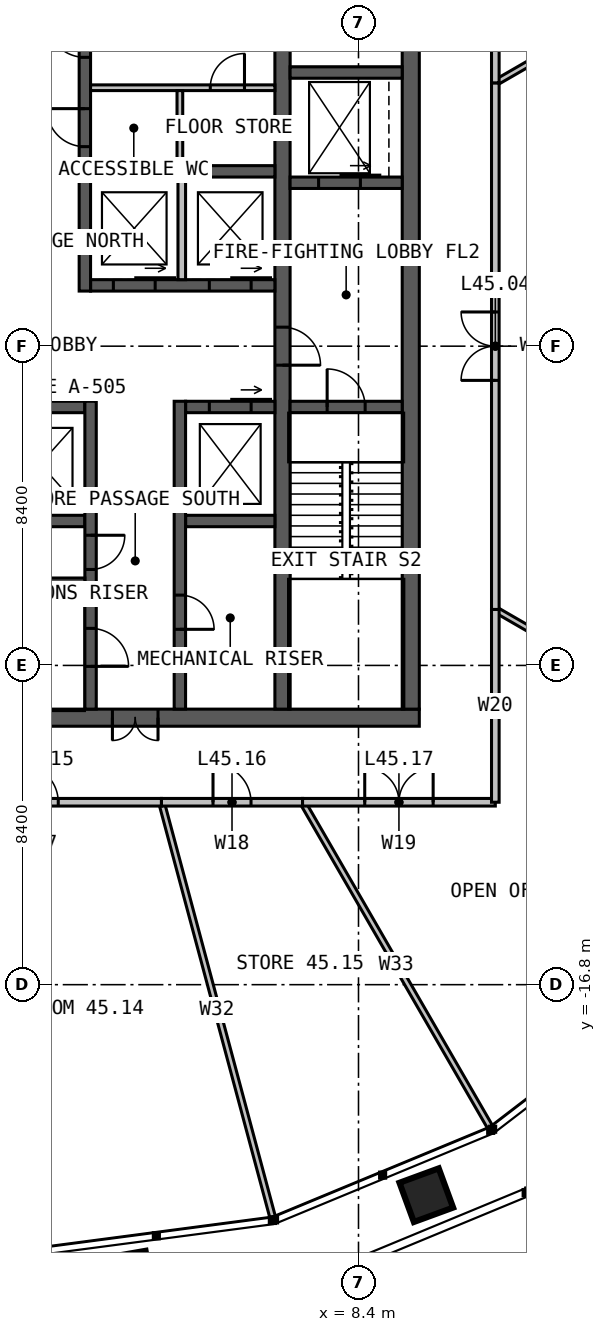
"""IFC4 building model, lengths in metres.
Left out: names, types, materials, properties, quantities, classifications, styles, units other than length and angle.
Written with IfcOpenShell. Run it as: python <this file> out.ifc"""

import sys

from ifc_helpers import new_model, si_unit, direction, frame, frame_2d, origin, place, context, subcontext, project, spatial, rectangle, extrude, element, fill, save


model = new_model("IFC4")
c1 = context("Model", 3, precision=1e-05, world=origin(), true_north=direction((0.0, 1.0)))
c2 = subcontext(c1, "Body", "Model", "MODEL_VIEW")
j1 = project(units=[si_unit("LENGTHUNIT", "METRE"), si_unit("PLANEANGLEUNIT", "RADIAN")], contexts=[c1])
p1 = place(None, origin())
s1 = spatial("IfcSite", under=j1, at=p1, CompositionType="ELEMENT")
p2 = place(p1, origin())
s2 = spatial("IfcBuilding", under=s1, at=p2, CompositionType="ELEMENT")
p3 = place(p2, frame((0.0, 0.0, 187.0)))
s3 = spatial("IfcBuildingStorey", under=s2, at=p3, CompositionType="ELEMENT", Elevation=187.0)
p4 = place(p3, frame((10.0, -9.775, 0.0), z_axis=(0.0, 0.0, 1.0), x_axis=(-1.0, 0.0, 0.0)))
e1 = element("IfcWall", 1, at=p4, inside=s3, PredefinedType="SOLIDWALL", context=c2, shape_type="SweptSolid", body=[
    extrude(rectangle(XDim=20.0, YDim=0.45, at=frame_2d((10.0, 0.0))), origin(), (0.0, 0.0, 1.0), 4.0),
])
p5 = place(p4, frame((6.875, 0.0, 0.0)))
e2 = element("IfcOpeningElement", 2, at=p5, cuts=e1, PredefinedType="OPENING", context=c2, shape_type="SweptSolid", body=[
    extrude(rectangle(XDim=1.2, YDim=2.2, at=frame_2d((0.6, 1.1))), frame((0.0, 0.235, 0.0), z_axis=(0.0, -1.0, 0.0), x_axis=(1.0, 0.0, 0.0)), (0.0, 0.0, 1.0), 0.47),
])
p6 = place(p3, frame((9.775, -9.55, 0.0), z_axis=(0.0, 0.0, 1.0), x_axis=(0.0, 1.0, 0.0)))
e3 = element("IfcWall", 3, at=p6, inside=s3, PredefinedType="SOLIDWALL", context=c2, shape_type="SweptSolid", body=[
    extrude(rectangle(XDim=19.1, YDim=0.45, at=frame_2d((9.55, 0.0))), origin(), (0.0, 0.0, 1.0), 4.0),
])
p7 = place(p3, frame((6.4, 9.55, 0.0), z_axis=(0.0, 0.0, 1.0), x_axis=(0.0, -1.0, 0.0)))
e4 = element("IfcWall", 4, at=p7, inside=s3, PredefinedType="SOLIDWALL", context=c2, shape_type="SweptSolid", body=[
    extrude(rectangle(XDim=19.1, YDim=0.4, at=frame_2d((9.55, 0.0))), origin(), (0.0, 0.0, 1.0), 4.0),
])
p8 = place(p7, frame((9.05, 0.0, 0.0)))
e5 = element("IfcOpeningElement", 5, at=p8, cuts=e4, PredefinedType="OPENING", context=c2, shape_type="SweptSolid", body=[
    extrude(rectangle(XDim=1.0, YDim=2.2, at=frame_2d((0.5, 1.1))), frame((0.0, 0.21, 0.0), z_axis=(0.0, -1.0, 0.0), x_axis=(1.0, 0.0, 0.0)), (0.0, 0.0, 1.0), 0.42),
])
p9 = place(p3, frame((1.35, 1.6, 0.0), z_axis=(0.0, 0.0, 1.0), x_axis=(1.0, 0.0, 0.0)))
e6 = element("IfcWall", 6, at=p9, inside=s3, PredefinedType="SOLIDWALL", context=c2, shape_type="SweptSolid", body=[
    extrude(rectangle(XDim=4.85, YDim=0.3, at=frame_2d((2.425, 0.0))), origin(), (0.0, 0.0, 1.0), 4.0),
])
p10 = place(p9, frame((0.6, 0.0, 0.0)))
e7 = element("IfcOpeningElement", 7, at=p10, cuts=e6, PredefinedType="OPENING", context=c2, shape_type="SweptSolid", body=[
    extrude(rectangle(XDim=1.1, YDim=2.2, at=frame_2d((0.55, 1.1))), frame((0.0, 0.16, 0.0), z_axis=(0.0, -1.0, 0.0), x_axis=(1.0, 0.0, 0.0)), (0.0, 0.0, 1.0), 0.32),
])
p11 = place(p9, frame((3.125, 0.0, 0.0)))
e8 = element("IfcOpeningElement", 8, at=p11, cuts=e6, PredefinedType="OPENING", context=c2, shape_type="SweptSolid", body=[
    extrude(rectangle(XDim=1.1, YDim=2.2, at=frame_2d((0.55, 1.1))), frame((0.0, 0.16, 0.0), z_axis=(0.0, -1.0, 0.0), x_axis=(1.0, 0.0, 0.0)), (0.0, 0.0, 1.0), 0.32),
])
p12 = place(p3, frame((1.35, 4.6, 0.0), z_axis=(0.0, 0.0, 1.0), x_axis=(1.0, 0.0, 0.0)))
e9 = element("IfcWall", 9, at=p12, inside=s3, PredefinedType="SOLIDWALL", context=c2, shape_type="SweptSolid", body=[
    extrude(rectangle(XDim=4.85, YDim=0.3, at=frame_2d((2.425, 0.0))), origin(), (0.0, 0.0, 1.0), 4.0),
])
p13 = place(p3, frame((1.2, 1.45, 0.0), z_axis=(0.0, 0.0, 1.0), x_axis=(0.0, 1.0, 0.0)))
e10 = element("IfcWall", 10, at=p13, inside=s3, PredefinedType="SOLIDWALL", context=c2, shape_type="SweptSolid", body=[
    extrude(rectangle(XDim=8.1, YDim=0.3, at=frame_2d((4.05, 0.0))), origin(), (0.0, 0.0, 1.0), 4.0),
])
p14 = place(p13, frame((3.8, 0.0, 0.0)))
e11 = element("IfcOpeningElement", 11, at=p14, cuts=e10, PredefinedType="OPENING", context=c2, shape_type="SweptSolid", body=[
    extrude(rectangle(XDim=1.0, YDim=2.2, at=frame_2d((0.5, 1.1))), frame((0.0, 0.16, 0.0), z_axis=(0.0, -1.0, 0.0), x_axis=(1.0, 0.0, 0.0)), (0.0, 0.0, 1.0), 0.32),
])
p15 = place(p13, frame((6.15, 0.0, 0.0)))
e12 = element("IfcOpeningElement", 12, at=p15, cuts=e10, PredefinedType="OPENING", context=c2, shape_type="SweptSolid", body=[
    extrude(rectangle(XDim=1.0, YDim=2.2, at=frame_2d((0.5, 1.1))), frame((0.0, 0.16, 0.0), z_axis=(0.0, -1.0, 0.0), x_axis=(1.0, 0.0, 0.0)), (0.0, 0.0, 1.0), 0.32),
])
p16 = place(p3, frame((-6.2, -1.6, 0.0), z_axis=(0.0, 0.0, 1.0), x_axis=(1.0, 0.0, 0.0)))
e13 = element("IfcWall", 13, at=p16, inside=s3, PredefinedType="SOLIDWALL", context=c2, shape_type="SweptSolid", body=[
    extrude(rectangle(XDim=7.4, YDim=0.3, at=frame_2d((3.7, 0.0))), origin(), (0.0, 0.0, 1.0), 4.0),
])
p17 = place(p3, frame((3.85, -1.6, 0.0), z_axis=(0.0, 0.0, 1.0), x_axis=(1.0, 0.0, 0.0)))
e14 = element("IfcWall", 14, at=p17, inside=s3, PredefinedType="SOLIDWALL", context=c2, shape_type="SweptSolid", body=[
    extrude(rectangle(XDim=2.35, YDim=0.3, at=frame_2d((1.175, 0.0))), origin(), (0.0, 0.0, 1.0), 4.0),
])
p18 = place(p17, frame((0.625, 0.0, 0.0)))
e15 = element("IfcOpeningElement", 15, at=p18, cuts=e14, PredefinedType="OPENING", context=c2, shape_type="SweptSolid", body=[
    extrude(rectangle(XDim=1.1, YDim=2.2, at=frame_2d((0.55, 1.1))), frame((0.0, 0.16, 0.0), z_axis=(0.0, -1.0, 0.0), x_axis=(1.0, 0.0, 0.0)), (0.0, 0.0, 1.0), 0.32),
])
p19 = place(p3, frame((-6.2, -4.6, 0.0), z_axis=(0.0, 0.0, 1.0), x_axis=(1.0, 0.0, 0.0)))
e16 = element("IfcWall", 16, at=p19, inside=s3, PredefinedType="SOLIDWALL", context=c2, shape_type="SweptSolid", body=[
    extrude(rectangle(XDim=7.4, YDim=0.3, at=frame_2d((3.7, 0.0))), origin(), (0.0, 0.0, 1.0), 4.0),
])
p20 = place(p3, frame((3.85, -4.6, 0.0), z_axis=(0.0, 0.0, 1.0), x_axis=(1.0, 0.0, 0.0)))
e17 = element("IfcWall", 17, at=p20, inside=s3, PredefinedType="SOLIDWALL", context=c2, shape_type="SweptSolid", body=[
    extrude(rectangle(XDim=2.35, YDim=0.3, at=frame_2d((1.175, 0.0))), origin(), (0.0, 0.0, 1.0), 4.0),
])
p21 = place(p3, frame((1.35, -1.45, 0.0), z_axis=(0.0, 0.0, 1.0), x_axis=(0.0, -1.0, 0.0)))
e18 = element("IfcWall", 18, at=p21, inside=s3, PredefinedType="SOLIDWALL", context=c2, shape_type="SweptSolid", body=[
    extrude(rectangle(XDim=8.1, YDim=0.3, at=frame_2d((4.05, 0.0))), origin(), (0.0, 0.0, 1.0), 4.0),
])
p22 = place(p21, frame((5.975, 0.0, 0.0)))
e19 = element("IfcOpeningElement", 19, at=p22, cuts=e18, PredefinedType="OPENING", context=c2, shape_type="SweptSolid", body=[
    extrude(rectangle(XDim=1.0, YDim=2.2, at=frame_2d((0.5, 1.1))), frame((0.0, 0.16, 0.0), z_axis=(0.0, -1.0, 0.0), x_axis=(1.0, 0.0, 0.0)), (0.0, 0.0, 1.0), 0.32),
])
p23 = place(p21, frame((3.525, 0.0, 0.0)))
e20 = element("IfcOpeningElement", 20, at=p23, cuts=e18, PredefinedType="OPENING", context=c2, shape_type="SweptSolid", body=[
    extrude(rectangle(XDim=0.9, YDim=2.2, at=frame_2d((0.45, 1.1))), frame((0.0, 0.16, 0.0), z_axis=(0.0, -1.0, 0.0), x_axis=(1.0, 0.0, 0.0)), (0.0, 0.0, 1.0), 0.32),
])
p24 = place(p3, frame((3.7, -1.45, 0.0), z_axis=(0.0, 0.0, 1.0), x_axis=(0.0, -1.0, 0.0)))
e21 = element("IfcWall", 21, at=p24, inside=s3, PredefinedType="SOLIDWALL", context=c2, shape_type="SweptSolid", body=[
    extrude(rectangle(XDim=8.1, YDim=0.3, at=frame_2d((4.05, 0.0))), origin(), (0.0, 0.0, 1.0), 4.0),
])
p25 = place(p24, frame((5.1, 0.0, 0.0)))
e22 = element("IfcOpeningElement", 22, at=p25, cuts=e21, PredefinedType="OPENING", context=c2, shape_type="SweptSolid", body=[
    extrude(rectangle(XDim=0.9, YDim=2.2, at=frame_2d((0.45, 1.1))), frame((0.0, 0.16, 0.0), z_axis=(0.0, -1.0, 0.0), x_axis=(1.0, 0.0, 0.0)), (0.0, 0.0, 1.0), 0.32),
])
p26 = place(p3, frame((-6.2, -6.2, 0.0), z_axis=(0.0, 0.0, 1.0), x_axis=(1.0, 0.0, 0.0)))
e23 = element("IfcWall", 23, at=p26, inside=s3, PredefinedType="SOLIDWALL", context=c2, shape_type="SweptSolid", body=[
    extrude(rectangle(XDim=7.4, YDim=0.2, at=frame_2d((3.7, 0.0))), origin(), (0.0, 0.0, 1.0), 4.0),
])
p27 = place(p3, frame((6.6, -1.6, 0.0), z_axis=(0.0, 0.0, 1.0), x_axis=(1.0, 0.0, 0.0)))
e24 = element("IfcWall", 24, at=p27, inside=s3, PredefinedType="SOLIDWALL", context=c2, shape_type="SweptSolid", body=[
    extrude(rectangle(XDim=2.95, YDim=0.3, at=frame_2d((1.475, 0.0))), origin(), (0.0, 0.0, 1.0), 4.0),
])
p28 = place(p27, frame((0.975, 0.0, 0.0)))
e25 = element("IfcOpeningElement", 25, at=p28, cuts=e24, PredefinedType="OPENING", context=c2, shape_type="SweptSolid", body=[
    extrude(rectangle(XDim=1.0, YDim=2.2, at=frame_2d((0.5, 1.1))), frame((0.0, 0.16, 0.0), z_axis=(0.0, -1.0, 0.0), x_axis=(1.0, 0.0, 0.0)), (0.0, 0.0, 1.0), 0.32),
])
p29 = place(p3, frame((6.6, 4.3, 0.0), z_axis=(0.0, 0.0, 1.0), x_axis=(1.0, 0.0, 0.0)))
e26 = element("IfcWall", 26, at=p29, inside=s3, PredefinedType="SOLIDWALL", context=c2, shape_type="SweptSolid", body=[
    extrude(rectangle(XDim=2.95, YDim=0.3, at=frame_2d((1.475, 0.0))), origin(), (0.0, 0.0, 1.0), 4.0),
])
p30 = place(p29, frame((0.75, 0.0, 0.0)))
e27 = element("IfcOpeningElement", 27, at=p30, cuts=e26, PredefinedType="OPENING", context=c2, shape_type="SweptSolid", body=[
    extrude(rectangle(XDim=1.1, YDim=2.2, at=frame_2d((0.55, 1.1))), frame((0.0, 0.16, 0.0), z_axis=(0.0, -1.0, 0.0), x_axis=(1.0, 0.0, 0.0)), (0.0, 0.0, 1.0), 0.32),
])
p31 = place(p3, frame((6.6, 7.2, 0.0), z_axis=(0.0, 0.0, 1.0), x_axis=(1.0, 0.0, 0.0)))
e28 = element("IfcWall", 28, at=p31, inside=s3, PredefinedType="SOLIDWALL", context=c2, shape_type="SweptSolid", body=[
    extrude(rectangle(XDim=2.95, YDim=0.3, at=frame_2d((1.475, 0.0))), origin(), (0.0, 0.0, 1.0), 4.0),
])
p32 = place(p3, frame((3.75, 1.75, 0.0), z_axis=(0.0, 0.0, 1.0), x_axis=(0.0, 1.0, 0.0)))
e29 = element("IfcWall", 29, at=p32, inside=s3, PredefinedType="SOLIDWALL", context=c2, shape_type="SweptSolid", body=[
    extrude(rectangle(XDim=2.7, YDim=0.2, at=frame_2d((1.35, 0.0))), origin(), (0.0, 0.0, 1.0), 3.75),
])
p33 = place(p3, frame((1.35, 6.8, 0.0), z_axis=(0.0, 0.0, 1.0), x_axis=(1.0, 0.0, 0.0)))
e30 = element("IfcWall", 30, at=p33, inside=s3, PredefinedType="PARTITIONING", context=c2, shape_type="SweptSolid", body=[
    extrude(rectangle(XDim=4.85, YDim=0.15, at=frame_2d((2.425, 0.0))), origin(), (0.0, 0.0, 1.0), 3.75),
])
p34 = place(p33, frame((3.15, 0.0, 0.0)))
e31 = element("IfcOpeningElement", 31, at=p34, cuts=e30, PredefinedType="OPENING", context=c2, shape_type="SweptSolid", body=[
    extrude(rectangle(XDim=0.9, YDim=2.2, at=frame_2d((0.45, 1.1))), frame((0.0, 0.085, 0.0), z_axis=(0.0, -1.0, 0.0), x_axis=(1.0, 0.0, 0.0)), (0.0, 0.0, 1.0), 0.17),
])
p35 = place(p3, frame((3.7, 4.75, 0.0), z_axis=(0.0, 0.0, 1.0), x_axis=(0.0, 1.0, 0.0)))
e32 = element("IfcWall", 32, at=p35, inside=s3, PredefinedType="PARTITIONING", context=c2, shape_type="SweptSolid", body=[
    extrude(rectangle(XDim=1.975, YDim=0.15, at=frame_2d((0.988, 0.0))), origin(), (0.0, 0.0, 1.0), 3.75),
])
for number, where, z_axis, x_axis in (
    (33, (12.0, -6.928, 0.0), (0.0, 0.0, 1.0), (0.866, -0.5, 0.0)),
    (34, (12.0, 6.928, 0.0), (0.0, 0.0, 1.0), (0.866, 0.5, 0.0)),
):
    element("IfcWall", number, at=place(p3, frame(where, z_axis=z_axis, x_axis=x_axis)), inside=s3, PredefinedType="PARTITIONING", context=c2, shape_type="SweptSolid", body=[
        extrude(rectangle(XDim=9.865, YDim=0.15, at=frame_2d((4.932, 0.0))), origin(), (0.0, 0.0, 1.0), 2.79),
    ])
p36 = place(p3, frame((3.215, -12.0, 0.0), z_axis=(0.0, 0.0, 1.0), x_axis=(0.258817816178, -0.965926155577, 0.0)))
e35 = element("IfcWall", 35, at=p36, inside=s3, PredefinedType="PARTITIONING", context=c2, shape_type="SweptSolid", body=[
    extrude(rectangle(XDim=11.298, YDim=0.15, at=frame_2d((5.649, 0.0))), origin(), (0.0, 0.0, 1.0), 2.79),
])
p37 = place(p3, frame((6.928, -12.0, 0.0), z_axis=(0.0, 0.0, 1.0), x_axis=(0.49999595416, -0.866027739639, 0.0)))
e36 = element("IfcWall", 36, at=p37, inside=s3, PredefinedType="PARTITIONING", context=c2, shape_type="SweptSolid", body=[
    extrude(rectangle(XDim=9.865, YDim=0.15, at=frame_2d((4.932, 0.0))), origin(), (0.0, 0.0, 1.0), 2.79),
])
p38 = place(p3, frame((12.0, -6.928, 0.0), z_axis=(0.0, 0.0, 1.0), x_axis=(0.0, 1.0, 0.0)))
e37 = element("IfcWall", 37, at=p38, inside=s3, PredefinedType="PARTITIONING", context=c2, shape_type="SweptSolid", body=[
    extrude(rectangle(XDim=13.856, YDim=0.2, at=frame_2d((6.928, 0.0))), origin(), (0.0, 0.0, 1.0), 3.8),
])
p39 = place(p38, frame((6.028, 0.0, 0.0)))
e38 = element("IfcOpeningElement", 38, at=p39, cuts=e37, PredefinedType="OPENING", context=c2, shape_type="SweptSolid", body=[
    extrude(rectangle(XDim=1.8, YDim=2.2, at=frame_2d((0.9, 1.1))), frame((0.0, 0.11, 0.0), z_axis=(0.0, -1.0, 0.0), x_axis=(1.0, 0.0, 0.0)), (0.0, 0.0, 1.0), 0.22),
])
p40 = place(p3, frame((12.0, 6.928, 0.0), z_axis=(0.0, 0.0, 1.0), x_axis=(0.0, 1.0, 0.0)))
e39 = element("IfcWall", 39, at=p40, inside=s3, PredefinedType="PARTITIONING", context=c2, shape_type="SweptSolid", body=[
    extrude(rectangle(XDim=5.072, YDim=0.2, at=frame_2d((2.536, 0.0))), origin(), (0.0, 0.0, 1.0), 3.8),
])
p41 = place(p3, frame((-3.215, -12.0, 0.0), z_axis=(0.0, 0.0, 1.0), x_axis=(1.0, 0.0, 0.0)))
e40 = element("IfcWall", 40, at=p41, inside=s3, PredefinedType="PARTITIONING", context=c2, shape_type="SweptSolid", body=[
    extrude(rectangle(XDim=6.431, YDim=0.2, at=frame_2d((3.215, 0.0))), origin(), (0.0, 0.0, 1.0), 3.8),
])
p42 = place(p41, frame((2.715, 0.0, 0.0)))
e41 = element("IfcOpeningElement", 41, at=p42, cuts=e40, PredefinedType="OPENING", context=c2, shape_type="SweptSolid", body=[
    extrude(rectangle(XDim=1.0, YDim=2.2, at=frame_2d((0.5, 1.1))), frame((0.0, 0.11, 0.0), z_axis=(0.0, -1.0, 0.0), x_axis=(1.0, 0.0, 0.0)), (0.0, 0.0, 1.0), 0.22),
])
p43 = place(p3, frame((3.215, -12.0, 0.0), z_axis=(0.0, 0.0, 1.0), x_axis=(1.0, 0.0, 0.0)))
e42 = element("IfcWall", 42, at=p43, inside=s3, PredefinedType="PARTITIONING", context=c2, shape_type="SweptSolid", body=[
    extrude(rectangle(XDim=3.713, YDim=0.2, at=frame_2d((1.856, 0.0))), origin(), (0.0, 0.0, 1.0), 3.8),
])
p44 = place(p43, frame((1.356, 0.0, 0.0)))
e43 = element("IfcOpeningElement", 43, at=p44, cuts=e42, PredefinedType="OPENING", context=c2, shape_type="SweptSolid", body=[
    extrude(rectangle(XDim=1.0, YDim=2.2, at=frame_2d((0.5, 1.1))), frame((0.0, 0.11, 0.0), z_axis=(0.0, -1.0, 0.0), x_axis=(1.0, 0.0, 0.0)), (0.0, 0.0, 1.0), 0.22),
])
p45 = place(p3, frame((6.928, -12.0, 0.0), z_axis=(0.0, 0.0, 1.0), x_axis=(1.0, 0.0, 0.0)))
e44 = element("IfcWall", 44, at=p45, inside=s3, PredefinedType="PARTITIONING", context=c2, shape_type="SweptSolid", body=[
    extrude(rectangle(XDim=5.072, YDim=0.2, at=frame_2d((2.536, 0.0))), origin(), (0.0, 0.0, 1.0), 3.8),
])
p46 = place(p45, frame((1.636, 0.0, 0.0)))
e45 = element("IfcOpeningElement", 45, at=p46, cuts=e44, PredefinedType="OPENING", context=c2, shape_type="SweptSolid", body=[
    extrude(rectangle(XDim=1.8, YDim=2.2, at=frame_2d((0.9, 1.1))), frame((0.0, 0.11, 0.0), z_axis=(0.0, -1.0, 0.0), x_axis=(1.0, 0.0, 0.0)), (0.0, 0.0, 1.0), 0.22),
])
p47 = place(p3, frame((12.0, -12.0, 0.0), z_axis=(0.0, 0.0, 1.0), x_axis=(0.0, 1.0, 0.0)))
e46 = element("IfcWall", 46, at=p47, inside=s3, PredefinedType="PARTITIONING", context=c2, shape_type="SweptSolid", body=[
    extrude(rectangle(XDim=5.072, YDim=0.2, at=frame_2d((2.536, 0.0))), origin(), (0.0, 0.0, 1.0), 3.8),
])
p48 = place(p5, origin())
e47 = element("IfcDoor", 47, at=p48, inside=s3, OperationType="DOUBLE_DOOR_SINGLE_SWING", PredefinedType="DOOR", context=c2, shape_type="SweptSolid", body=[
    extrude(rectangle(XDim=1.2, YDim=2.2, at=frame_2d((0.6, 1.1))), frame((0.0, 0.025, 0.0), z_axis=(0.0, -1.0, 0.0), x_axis=(1.0, 0.0, 0.0)), (0.0, 0.0, 1.0), 0.05),
])
fill(e2, e47)
p49 = place(p8, origin())
e48 = element("IfcDoor", 48, at=p49, inside=s3, OperationType="SINGLE_SWING_RIGHT", PredefinedType="DOOR", context=c2, shape_type="SweptSolid", body=[
    extrude(rectangle(XDim=1.0, YDim=2.2, at=frame_2d((0.5, 1.1))), frame((0.0, 0.025, 0.0), z_axis=(0.0, -1.0, 0.0), x_axis=(1.0, 0.0, 0.0)), (0.0, 0.0, 1.0), 0.05),
])
fill(e5, e48)
p50 = place(p28, origin())
e49 = element("IfcDoor", 49, at=p50, inside=s3, OperationType="SINGLE_SWING_LEFT", PredefinedType="DOOR", context=c2, shape_type="SweptSolid", body=[
    extrude(rectangle(XDim=1.0, YDim=2.2, at=frame_2d((0.5, 1.1))), frame((0.0, 0.025, 0.0), z_axis=(0.0, -1.0, 0.0), x_axis=(1.0, 0.0, 0.0)), (0.0, 0.0, 1.0), 0.05),
])
fill(e25, e49)
p51 = place(p22, origin())
e50 = element("IfcDoor", 50, at=p51, inside=s3, OperationType="SINGLE_SWING_RIGHT", PredefinedType="DOOR", context=c2, shape_type="SweptSolid", body=[
    extrude(rectangle(XDim=1.0, YDim=2.2, at=frame_2d((0.5, 1.1))), frame((0.0, 0.025, 0.0), z_axis=(0.0, -1.0, 0.0), x_axis=(1.0, 0.0, 0.0)), (0.0, 0.0, 1.0), 0.05),
])
fill(e19, e50)
p52 = place(p14, origin())
e51 = element("IfcDoor", 51, at=p52, inside=s3, OperationType="SINGLE_SWING_RIGHT", PredefinedType="DOOR", context=c2, shape_type="SweptSolid", body=[
    extrude(rectangle(XDim=1.0, YDim=2.2, at=frame_2d((0.5, 1.1))), frame((0.0, 0.025, 0.0), z_axis=(0.0, -1.0, 0.0), x_axis=(1.0, 0.0, 0.0)), (0.0, 0.0, 1.0), 0.05),
])
fill(e11, e51)
p53 = place(p15, origin())
e52 = element("IfcDoor", 52, at=p53, inside=s3, OperationType="SINGLE_SWING_RIGHT", PredefinedType="DOOR", context=c2, shape_type="SweptSolid", body=[
    extrude(rectangle(XDim=1.0, YDim=2.2, at=frame_2d((0.5, 1.1))), frame((0.0, 0.025, 0.0), z_axis=(0.0, -1.0, 0.0), x_axis=(1.0, 0.0, 0.0)), (0.0, 0.0, 1.0), 0.05),
])
fill(e12, e52)
p54 = place(p23, origin())
e53 = element("IfcDoor", 53, at=p54, inside=s3, OperationType="SINGLE_SWING_LEFT", PredefinedType="DOOR", context=c2, shape_type="SweptSolid", body=[
    extrude(rectangle(XDim=0.9, YDim=2.2, at=frame_2d((0.45, 1.1))), frame((0.0, 0.025, 0.0), z_axis=(0.0, -1.0, 0.0), x_axis=(1.0, 0.0, 0.0)), (0.0, 0.0, 1.0), 0.05),
])
fill(e20, e53)
p55 = place(p25, origin())
e54 = element("IfcDoor", 54, at=p55, inside=s3, OperationType="SINGLE_SWING_RIGHT", PredefinedType="DOOR", context=c2, shape_type="SweptSolid", body=[
    extrude(rectangle(XDim=0.9, YDim=2.2, at=frame_2d((0.45, 1.1))), frame((0.0, 0.025, 0.0), z_axis=(0.0, -1.0, 0.0), x_axis=(1.0, 0.0, 0.0)), (0.0, 0.0, 1.0), 0.05),
])
fill(e22, e54)
p56 = place(p34, origin())
e55 = element("IfcDoor", 55, at=p56, inside=s3, OperationType="SINGLE_SWING_RIGHT", PredefinedType="DOOR", context=c2, shape_type="SweptSolid", body=[
    extrude(rectangle(XDim=0.9, YDim=2.2, at=frame_2d((0.45, 1.1))), frame((0.0, 0.025, 0.0), z_axis=(0.0, -1.0, 0.0), x_axis=(1.0, 0.0, 0.0)), (0.0, 0.0, 1.0), 0.05),
])
fill(e31, e55)
p57 = place(p10, origin())
e56 = element("IfcDoor", 56, at=p57, inside=s3, OperationType="SLIDING_TO_LEFT", PredefinedType="DOOR", context=c2, shape_type="SweptSolid", body=[
    extrude(rectangle(XDim=1.1, YDim=2.2, at=frame_2d((0.55, 1.1))), frame((0.0, 0.025, 0.0), z_axis=(0.0, -1.0, 0.0), x_axis=(1.0, 0.0, 0.0)), (0.0, 0.0, 1.0), 0.05),
])
fill(e7, e56)
p58 = place(p11, origin())
e57 = element("IfcDoor", 57, at=p58, inside=s3, OperationType="SLIDING_TO_LEFT", PredefinedType="DOOR", context=c2, shape_type="SweptSolid", body=[
    extrude(rectangle(XDim=1.1, YDim=2.2, at=frame_2d((0.55, 1.1))), frame((0.0, 0.025, 0.0), z_axis=(0.0, -1.0, 0.0), x_axis=(1.0, 0.0, 0.0)), (0.0, 0.0, 1.0), 0.05),
])
fill(e8, e57)
p59 = place(p18, origin())
e58 = element("IfcDoor", 58, at=p59, inside=s3, OperationType="SLIDING_TO_LEFT", PredefinedType="DOOR", context=c2, shape_type="SweptSolid", body=[
    extrude(rectangle(XDim=1.1, YDim=2.2, at=frame_2d((0.55, 1.1))), frame((0.0, 0.025, 0.0), z_axis=(0.0, -1.0, 0.0), x_axis=(1.0, 0.0, 0.0)), (0.0, 0.0, 1.0), 0.05),
])
fill(e15, e58)
p60 = place(p30, origin())
e59 = element("IfcDoor", 59, at=p60, inside=s3, OperationType="SLIDING_TO_LEFT", PredefinedType="DOOR", context=c2, shape_type="SweptSolid", body=[
    extrude(rectangle(XDim=1.1, YDim=2.2, at=frame_2d((0.55, 1.1))), frame((0.0, 0.025, 0.0), z_axis=(0.0, -1.0, 0.0), x_axis=(1.0, 0.0, 0.0)), (0.0, 0.0, 1.0), 0.05),
])
fill(e27, e59)
p61 = place(p39, origin())
e60 = element("IfcDoor", 60, at=p61, inside=s3, OperationType="DOUBLE_DOOR_SINGLE_SWING", PredefinedType="DOOR", context=c2, shape_type="SweptSolid", body=[
    extrude(rectangle(XDim=1.8, YDim=2.2, at=frame_2d((0.9, 1.1))), frame((0.0, 0.025, 0.0), z_axis=(0.0, -1.0, 0.0), x_axis=(1.0, 0.0, 0.0)), (0.0, 0.0, 1.0), 0.05),
])
fill(e38, e60)
p62 = place(p42, origin())
e61 = element("IfcDoor", 61, at=p62, inside=s3, OperationType="SINGLE_SWING_LEFT", PredefinedType="DOOR", context=c2, shape_type="SweptSolid", body=[
    extrude(rectangle(XDim=1.0, YDim=2.2, at=frame_2d((0.5, 1.1))), frame((0.0, 0.025, 0.0), z_axis=(0.0, -1.0, 0.0), x_axis=(1.0, 0.0, 0.0)), (0.0, 0.0, 1.0), 0.05),
])
fill(e41, e61)
p63 = place(p44, origin())
e62 = element("IfcDoor", 62, at=p63, inside=s3, OperationType="SINGLE_SWING_LEFT", PredefinedType="DOOR", context=c2, shape_type="SweptSolid", body=[
    extrude(rectangle(XDim=1.0, YDim=2.2, at=frame_2d((0.5, 1.1))), frame((0.0, 0.025, 0.0), z_axis=(0.0, -1.0, 0.0), x_axis=(1.0, 0.0, 0.0)), (0.0, 0.0, 1.0), 0.05),
])
fill(e43, e62)
p64 = place(p46, origin())
e63 = element("IfcDoor", 63, at=p64, inside=s3, OperationType="DOUBLE_DOOR_SINGLE_SWING", PredefinedType="DOOR", context=c2, shape_type="SweptSolid", body=[
    extrude(rectangle(XDim=1.8, YDim=2.2, at=frame_2d((0.9, 1.1))), frame((0.0, 0.025, 0.0), z_axis=(0.0, -1.0, 0.0), x_axis=(1.0, 0.0, 0.0)), (0.0, 0.0, 1.0), 0.05),
])
fill(e45, e63)
save(model, sys.argv[1])
